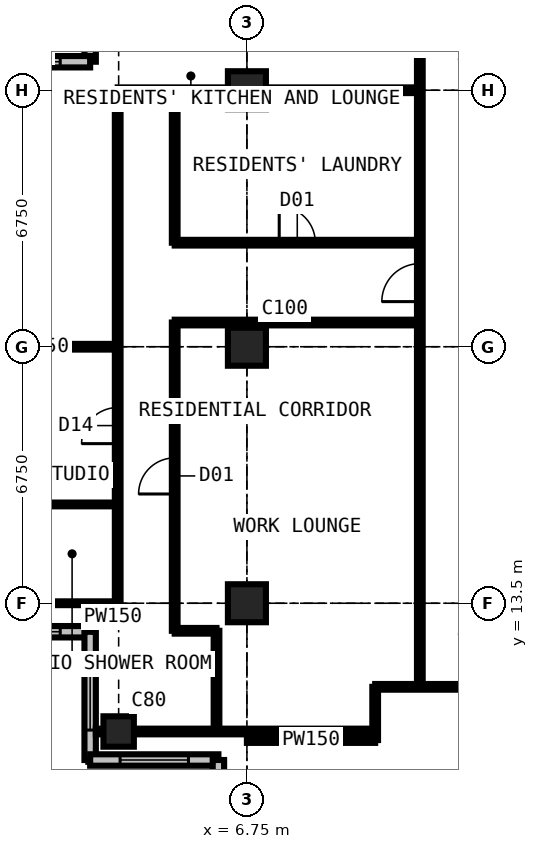
"""IFC4 building model, lengths in metres.
Left out: names, types, materials, properties, quantities, classifications, styles, units other than length and angle.
Written with IfcOpenShell. Run it as: python <this file> out.ifc"""

import sys

from ifc_helpers import new_model, si_unit, direction, frame, frame_2d, origin, origin_2d, place, context, subcontext, project, spatial, rectangle, extrude, element, fill, save


model = new_model("IFC4")
c1 = context("Model", 3, precision=1e-05, world=origin(), true_north=direction((0.0, 1.0)))
c2 = subcontext(c1, "Body", "Model", "MODEL_VIEW")
j1 = project(units=[si_unit("LENGTHUNIT", "METRE"), si_unit("PLANEANGLEUNIT", "RADIAN")], contexts=[c1])
p1 = place(None, origin())
s1 = spatial("IfcSite", under=j1, at=p1, CompositionType="ELEMENT")
p2 = place(p1, origin())
s2 = spatial("IfcBuilding", under=s1, at=p2, CompositionType="ELEMENT")
p3 = place(p2, frame((0.0, 0.0, 236.7)))
s3 = spatial("IfcBuildingStorey", under=s2, at=p3, CompositionType="ELEMENT", Elevation=236.7)
p4 = place(p3, frame((3.375, 10.125, 0.0), z_axis=(0.0, 0.0, 1.0), x_axis=(1.0, 0.0, 0.0)))
e1 = element("IfcColumn", 1, at=p4, inside=s3, PredefinedType="COLUMN", context=c2, shape_type="SweptSolid", body=[
    extrude(rectangle(XDim=0.8, YDim=0.8, at=origin_2d()), origin(), (0.0, 0.0, 1.0), 3.6),
])
for number, where, z_axis, x_axis in (
    (2, (6.75, 13.5, 0.0), (0.0, 0.0, 1.0), (1.0, 0.0, 0.0)),
    (3, (6.75, 20.25, 0.0), (0.0, 0.0, 1.0), (1.0, 0.0, 0.0)),
    (4, (6.75, 27.0, 0.0), (0.0, 0.0, 1.0), (1.0, 0.0, 0.0)),
):
    element("IfcColumn", number, at=place(p3, frame(where, z_axis=z_axis, x_axis=x_axis)), inside=s3, PredefinedType="COLUMN", context=c2, shape_type="SweptSolid", body=[
        extrude(rectangle(XDim=1.0, YDim=1.0, at=origin_2d()), origin(), (0.0, 0.0, 1.0), 3.6),
    ])
p5 = place(p3, frame((2.625, 31.125, 0.0), z_axis=(0.0, 0.0, 1.0), x_axis=(0.0, -1.0, 0.0)))
e5 = element("IfcWall", 5, at=p5, inside=s3, PredefinedType="SOLIDWALL", context=c2, shape_type="SweptSolid", body=[
    extrude(rectangle(XDim=3.375, YDim=0.3, at=frame_2d((1.688, 0.0))), origin(), (0.0, 0.0, 1.0), 3.375),
])
p6 = place(p5, frame((0.788, 0.0, 0.6)))
e6 = element("IfcOpeningElement", 6, at=p6, cuts=e5, PredefinedType="OPENING", context=c2, shape_type="SweptSolid", body=[
    extrude(rectangle(XDim=1.8, YDim=2.1, at=frame_2d((0.9, 1.05))), frame((0.0, 0.16, 0.0), z_axis=(0.0, -1.0, 0.0), x_axis=(1.0, 0.0, 0.0)), (0.0, 0.0, 1.0), 0.32),
])
p7 = place(p3, frame((2.625, 27.75, 0.0), z_axis=(0.0, 0.0, 1.0), x_axis=(-1.0, 0.0, 0.0)))
e7 = element("IfcWall", 7, at=p7, inside=s3, PredefinedType="SOLIDWALL", context=c2, shape_type="SweptSolid", body=[
    extrude(rectangle(XDim=3.375, YDim=0.3, at=frame_2d((1.688, 0.0))), origin(), (0.0, 0.0, 1.0), 3.375),
])
p8 = place(p7, frame((0.788, 0.0, 0.6)))
e8 = element("IfcOpeningElement", 8, at=p8, cuts=e7, PredefinedType="OPENING", context=c2, shape_type="SweptSolid", body=[
    extrude(rectangle(XDim=1.8, YDim=2.1, at=frame_2d((0.9, 1.05))), frame((0.0, 0.16, 0.0), z_axis=(0.0, -1.0, 0.0), x_axis=(1.0, 0.0, 0.0)), (0.0, 0.0, 1.0), 0.32),
])
p9 = place(p3, frame((-0.75, 12.75, 0.0), z_axis=(0.0, 0.0, 1.0), x_axis=(1.0, 0.0, 0.0)))
e9 = element("IfcWall", 9, at=p9, inside=s3, PredefinedType="SOLIDWALL", context=c2, shape_type="SweptSolid", body=[
    extrude(rectangle(XDim=3.375, YDim=0.3, at=frame_2d((1.688, 0.0))), origin(), (0.0, 0.0, 1.0), 3.375),
])
p10 = place(p9, frame((0.788, 0.0, 0.6)))
e10 = element("IfcOpeningElement", 10, at=p10, cuts=e9, PredefinedType="OPENING", context=c2, shape_type="SweptSolid", body=[
    extrude(rectangle(XDim=1.8, YDim=2.1, at=frame_2d((0.9, 1.05))), frame((0.0, 0.16, 0.0), z_axis=(0.0, -1.0, 0.0), x_axis=(1.0, 0.0, 0.0)), (0.0, 0.0, 1.0), 0.32),
])
p11 = place(p3, frame((2.625, 12.75, 0.0), z_axis=(0.0, 0.0, 1.0), x_axis=(0.0, -1.0, 0.0)))
e11 = element("IfcWall", 11, at=p11, inside=s3, PredefinedType="SOLIDWALL", context=c2, shape_type="SweptSolid", body=[
    extrude(rectangle(XDim=3.375, YDim=0.3, at=frame_2d((1.688, 0.0))), origin(), (0.0, 0.0, 1.0), 3.375),
])
p12 = place(p11, frame((0.788, 0.0, 0.6)))
e12 = element("IfcOpeningElement", 12, at=p12, cuts=e11, PredefinedType="OPENING", context=c2, shape_type="SweptSolid", body=[
    extrude(rectangle(XDim=1.8, YDim=2.1, at=frame_2d((0.9, 1.05))), frame((0.0, 0.16, 0.0), z_axis=(0.0, -1.0, 0.0), x_axis=(1.0, 0.0, 0.0)), (0.0, 0.0, 1.0), 0.32),
])
p13 = place(p3, frame((2.625, 9.375, 0.0), z_axis=(0.0, 0.0, 1.0), x_axis=(1.0, 0.0, 0.0)))
e13 = element("IfcWall", 13, at=p13, inside=s3, PredefinedType="SOLIDWALL", context=c2, shape_type="SweptSolid", body=[
    extrude(rectangle(XDim=3.375, YDim=0.3, at=frame_2d((1.688, 0.0))), origin(), (0.0, 0.0, 1.0), 3.375),
])
p14 = place(p13, frame((0.788, 0.0, 0.6)))
e14 = element("IfcOpeningElement", 14, at=p14, cuts=e13, PredefinedType="OPENING", context=c2, shape_type="SweptSolid", body=[
    extrude(rectangle(XDim=1.8, YDim=2.1, at=frame_2d((0.9, 1.05))), frame((0.0, 0.16, 0.0), z_axis=(0.0, -1.0, 0.0), x_axis=(1.0, 0.0, 0.0)), (0.0, 0.0, 1.0), 0.32),
])
p15 = place(p3, frame((6.0, 9.375, 0.0), z_axis=(0.0, 0.0, 1.0), x_axis=(0.0, -1.0, 0.0)))
e15 = element("IfcWall", 15, at=p15, inside=s3, PredefinedType="SOLIDWALL", context=c2, shape_type="SweptSolid", body=[
    extrude(rectangle(XDim=3.375, YDim=0.3, at=frame_2d((1.688, 0.0))), origin(), (0.0, 0.0, 1.0), 3.375),
])
p16 = place(p15, frame((0.788, 0.0, 0.6)))
e16 = element("IfcOpeningElement", 16, at=p16, cuts=e15, PredefinedType="OPENING", context=c2, shape_type="SweptSolid", body=[
    extrude(rectangle(XDim=1.8, YDim=2.1, at=frame_2d((0.9, 1.05))), frame((0.0, 0.16, 0.0), z_axis=(0.0, -1.0, 0.0), x_axis=(1.0, 0.0, 0.0)), (0.0, 0.0, 1.0), 0.32),
])
p17 = place(p3, frame((-0.734, 13.5, 0.0), z_axis=(0.0, 0.0, 1.0), x_axis=(1.0, 0.0, 0.0)))
e17 = element("IfcWall", 17, at=p17, inside=s3, PredefinedType="PARTITIONING", context=c2, shape_type="SweptSolid", body=[
    extrude(rectangle(XDim=4.084, YDim=0.1, at=frame_2d((2.042, 0.0))), origin(), (0.0, 0.0, 1.0), 2.877),
])
p18 = place(p3, frame((-0.734, 20.25, 0.0), z_axis=(0.0, 0.0, 1.0), x_axis=(1.0, 0.0, 0.0)))
e18 = element("IfcWall", 18, at=p18, inside=s3, PredefinedType="PARTITIONING", context=c2, shape_type="SweptSolid", body=[
    extrude(rectangle(XDim=4.084, YDim=0.15, at=frame_2d((2.042, 0.0))), origin(), (0.0, 0.0, 1.0), 2.877),
])
p19 = place(p3, frame((0.95, 16.1, 0.0), z_axis=(0.0, 0.0, 1.0), x_axis=(1.0, 0.0, 0.0)))
e19 = element("IfcWall", 19, at=p19, inside=s3, PredefinedType="PARTITIONING", context=c2, shape_type="SweptSolid", body=[
    extrude(rectangle(XDim=2.4, YDim=0.1, at=frame_2d((1.2, 0.0))), origin(), (0.0, 0.0, 1.0), 3.375),
])
p20 = place(p3, frame((2.625, 12.766, 0.0), z_axis=(0.0, 0.0, 1.0), x_axis=(0.0, 1.0, 0.0)))
e20 = element("IfcWall", 20, at=p20, inside=s3, PredefinedType="PARTITIONING", context=c2, shape_type="SweptSolid", body=[
    extrude(rectangle(XDim=0.734, YDim=0.15, at=frame_2d((0.367, 0.0))), origin(), (0.0, 0.0, 1.0), 3.375),
])
p21 = place(p3, frame((2.775, 10.125, 0.0), z_axis=(0.0, 0.0, 1.0), x_axis=(1.0, 0.0, 0.0)))
e21 = element("IfcWall", 21, at=p21, inside=s3, PredefinedType="PARTITIONING", context=c2, shape_type="SweptSolid", body=[
    extrude(rectangle(XDim=7.35, YDim=0.15, at=frame_2d((3.675, 0.0))), origin(), (0.0, 0.0, 1.0), 2.877),
])
p22 = place(p3, frame((3.35, 13.5, 0.0), z_axis=(0.0, 0.0, 1.0), x_axis=(0.0, 1.0, 0.0)))
e22 = element("IfcWall", 22, at=p22, inside=s3, PredefinedType="PARTITIONING", context=c2, shape_type="SweptSolid", body=[
    extrude(rectangle(XDim=13.5, YDim=0.15, at=frame_2d((6.75, 0.0))), origin(), (0.0, 0.0, 1.0), 3.375),
])
p23 = place(p22, frame((4.2, 0.0, 0.0)))
e23 = element("IfcOpeningElement", 23, at=p23, cuts=e22, PredefinedType="OPENING", context=c2, shape_type="SweptSolid", body=[
    extrude(rectangle(XDim=0.95, YDim=2.2, at=frame_2d((0.475, 1.1))), frame((0.0, 0.085, 0.0), z_axis=(0.0, -1.0, 0.0), x_axis=(1.0, 0.0, 0.0)), (0.0, 0.0, 1.0), 0.17),
])
p24 = place(p3, frame((3.35, 27.0, 0.0), z_axis=(0.0, 0.0, 1.0), x_axis=(1.0, 0.0, 0.0)))
e24 = element("IfcWall", 24, at=p24, inside=s3, PredefinedType="PARTITIONING", context=c2, shape_type="SweptSolid", body=[
    extrude(rectangle(XDim=7.95, YDim=0.15, at=frame_2d((3.975, 0.0))), origin(), (0.0, 0.0, 1.0), 2.877),
])
p25 = place(p3, frame((4.85, 12.775, 0.0), z_axis=(0.0, 0.0, 1.0), x_axis=(0.0, 1.0, 0.0)))
e25 = element("IfcWall", 25, at=p25, inside=s3, PredefinedType="PARTITIONING", context=c2, shape_type="SweptSolid", body=[
    extrude(rectangle(XDim=8.113, YDim=0.15, at=frame_2d((4.056, 0.0))), origin(), (0.0, 0.0, 1.0), 3.375),
])
p26 = place(p25, frame((3.6, 0.0, 0.0)))
e26 = element("IfcOpeningElement", 26, at=p26, cuts=e25, PredefinedType="OPENING", context=c2, shape_type="SweptSolid", body=[
    extrude(rectangle(XDim=0.95, YDim=2.2, at=frame_2d((0.475, 1.1))), frame((0.0, 0.085, 0.0), z_axis=(0.0, -1.0, 0.0), x_axis=(1.0, 0.0, 0.0)), (0.0, 0.0, 1.0), 0.17),
])
p27 = place(p3, frame((4.85, 12.775, 0.0), z_axis=(0.0, 0.0, 1.0), x_axis=(1.0, 0.0, 0.0)))
e27 = element("IfcWall", 27, at=p27, inside=s3, PredefinedType="PARTITIONING", context=c2, shape_type="SweptSolid", body=[
    extrude(rectangle(XDim=1.1, YDim=0.15, at=frame_2d((0.55, 0.0))), origin(), (0.0, 0.0, 1.0), 3.375),
])
p28 = place(p3, frame((4.85, 20.887, 0.0), z_axis=(0.0, 0.0, 1.0), x_axis=(1.0, 0.0, 0.0)))
e28 = element("IfcWall", 28, at=p28, inside=s3, PredefinedType="PARTITIONING", context=c2, shape_type="SweptSolid", body=[
    extrude(rectangle(XDim=6.45, YDim=0.15, at=frame_2d((3.225, 0.0))), origin(), (0.0, 0.0, 1.0), 3.375),
])
p29 = place(p3, frame((4.85, 22.988, 0.0), z_axis=(0.0, 0.0, 1.0), x_axis=(0.0, 1.0, 0.0)))
e29 = element("IfcWall", 29, at=p29, inside=s3, PredefinedType="PARTITIONING", context=c2, shape_type="SweptSolid", body=[
    extrude(rectangle(XDim=4.012, YDim=0.15, at=frame_2d((2.006, 0.0))), origin(), (0.0, 0.0, 1.0), 3.375),
])
p30 = place(p3, frame((4.85, 22.988, 0.0), z_axis=(0.0, 0.0, 1.0), x_axis=(1.0, 0.0, 0.0)))
e30 = element("IfcWall", 30, at=p30, inside=s3, PredefinedType="PARTITIONING", context=c2, shape_type="SweptSolid", body=[
    extrude(rectangle(XDim=6.45, YDim=0.15, at=frame_2d((3.225, 0.0))), origin(), (0.0, 0.0, 1.0), 3.375),
])
p31 = place(p30, frame((2.75, 0.0, 0.0)))
e31 = element("IfcOpeningElement", 31, at=p31, cuts=e30, PredefinedType="OPENING", context=c2, shape_type="SweptSolid", body=[
    extrude(rectangle(XDim=0.95, YDim=2.2, at=frame_2d((0.475, 1.1))), frame((0.0, 0.085, 0.0), z_axis=(0.0, -1.0, 0.0), x_axis=(1.0, 0.0, 0.0)), (0.0, 0.0, 1.0), 0.17),
])
p32 = place(p3, frame((5.95, 10.125, 0.0), z_axis=(0.0, 0.0, 1.0), x_axis=(0.0, 1.0, 0.0)))
e32 = element("IfcWall", 32, at=p32, inside=s3, PredefinedType="PARTITIONING", context=c2, shape_type="SweptSolid", body=[
    extrude(rectangle(XDim=2.65, YDim=0.15, at=frame_2d((1.325, 0.0))), origin(), (0.0, 0.0, 1.0), 3.375),
])
p33 = place(p3, frame((6.75, 9.9, 0.0), z_axis=(0.0, 0.0, 1.0), x_axis=(1.0, 0.0, 0.0)))
e33 = element("IfcWall", 33, at=p33, inside=s3, PredefinedType="PARTITIONING", context=c2, shape_type="SweptSolid", body=[
    extrude(rectangle(XDim=3.375, YDim=0.15, at=frame_2d((1.688, 0.0))), origin(), (0.0, 0.0, 1.0), 3.375),
])
p34 = place(p3, frame((10.125, 9.9, 0.0), z_axis=(0.0, 0.0, 1.0), x_axis=(0.0, 1.0, 0.0)))
e34 = element("IfcWall", 34, at=p34, inside=s3, PredefinedType="PARTITIONING", context=c2, shape_type="SweptSolid", body=[
    extrude(rectangle(XDim=1.4, YDim=0.15, at=frame_2d((0.7, 0.0))), origin(), (0.0, 0.0, 1.0), 3.375),
])
p35 = place(p3, frame((10.125, 11.3, 0.0), z_axis=(0.0, 0.0, 1.0), x_axis=(1.0, 0.0, 0.0)))
e35 = element("IfcWall", 35, at=p35, inside=s3, PredefinedType="PARTITIONING", context=c2, shape_type="SweptSolid", body=[
    extrude(rectangle(XDim=3.375, YDim=0.15, at=frame_2d((1.688, 0.0))), origin(), (0.0, 0.0, 1.0), 3.375),
])
p36 = place(p3, frame((11.3, 11.3, 0.0), z_axis=(0.0, 0.0, 1.0), x_axis=(0.0, 1.0, 0.0)))
e36 = element("IfcWall", 36, at=p36, inside=s3, PredefinedType="PARTITIONING", context=c2, shape_type="SweptSolid", body=[
    extrude(rectangle(XDim=19.3, YDim=0.15, at=frame_2d((9.65, 0.0))), origin(), (0.0, 0.0, 1.0), 3.375),
])
p37 = place(p36, frame((18.1, 0.0, 0.0)))
e37 = element("IfcOpeningElement", 37, at=p37, cuts=e36, PredefinedType="OPENING", context=c2, shape_type="SweptSolid", body=[
    extrude(rectangle(XDim=1.0, YDim=2.2, at=frame_2d((0.5, 1.1))), frame((0.0, 0.085, 0.0), z_axis=(0.0, -1.0, 0.0), x_axis=(1.0, 0.0, 0.0)), (0.0, 0.0, 1.0), 0.17),
])
p38 = place(p36, frame((10.137, 0.0, 0.0)))
e38 = element("IfcOpeningElement", 38, at=p38, cuts=e36, PredefinedType="OPENING", context=c2, shape_type="SweptSolid", body=[
    extrude(rectangle(XDim=1.0, YDim=2.2, at=frame_2d((0.5, 1.1))), frame((0.0, 0.085, 0.0), z_axis=(0.0, -1.0, 0.0), x_axis=(1.0, 0.0, 0.0)), (0.0, 0.0, 1.0), 0.17),
])
p39 = place(p8, origin())
e39 = element("IfcWindow", 39, at=p39, inside=s3, PartitioningType="SINGLE_PANEL", PredefinedType="WINDOW", context=c2, shape_type="SweptSolid", body=[
    extrude(rectangle(XDim=1.8, YDim=2.1, at=frame_2d((0.9, 1.05))), frame((0.0, 0.03, 0.0), z_axis=(0.0, -1.0, 0.0), x_axis=(1.0, 0.0, 0.0)), (0.0, 0.0, 1.0), 0.06),
])
fill(e8, e39)
p40 = place(p10, origin())
e40 = element("IfcWindow", 40, at=p40, inside=s3, PartitioningType="SINGLE_PANEL", PredefinedType="WINDOW", context=c2, shape_type="SweptSolid", body=[
    extrude(rectangle(XDim=1.8, YDim=2.1, at=frame_2d((0.9, 1.05))), frame((0.0, 0.03, 0.0), z_axis=(0.0, -1.0, 0.0), x_axis=(1.0, 0.0, 0.0)), (0.0, 0.0, 1.0), 0.06),
])
fill(e10, e40)
p41 = place(p12, origin())
e41 = element("IfcWindow", 41, at=p41, inside=s3, PartitioningType="SINGLE_PANEL", PredefinedType="WINDOW", context=c2, shape_type="SweptSolid", body=[
    extrude(rectangle(XDim=1.8, YDim=2.1, at=frame_2d((0.9, 1.05))), frame((0.0, 0.03, 0.0), z_axis=(0.0, -1.0, 0.0), x_axis=(1.0, 0.0, 0.0)), (0.0, 0.0, 1.0), 0.06),
])
fill(e12, e41)
p42 = place(p14, origin())
e42 = element("IfcWindow", 42, at=p42, inside=s3, PartitioningType="SINGLE_PANEL", PredefinedType="WINDOW", context=c2, shape_type="SweptSolid", body=[
    extrude(rectangle(XDim=1.8, YDim=2.1, at=frame_2d((0.9, 1.05))), frame((0.0, 0.03, 0.0), z_axis=(0.0, -1.0, 0.0), x_axis=(1.0, 0.0, 0.0)), (0.0, 0.0, 1.0), 0.06),
])
fill(e14, e42)
p43 = place(p23, origin())
e43 = element("IfcDoor", 43, at=p43, inside=s3, OperationType="SINGLE_SWING_LEFT", PredefinedType="DOOR", context=c2, shape_type="SweptSolid", body=[
    extrude(rectangle(XDim=0.95, YDim=2.2, at=frame_2d((0.475, 1.1))), frame((0.0, 0.025, 0.0), z_axis=(0.0, -1.0, 0.0), x_axis=(1.0, 0.0, 0.0)), (0.0, 0.0, 1.0), 0.05),
])
fill(e23, e43)
p44 = place(p38, origin())
e44 = element("IfcDoor", 44, at=p44, inside=s3, OperationType="SINGLE_SWING_LEFT", PredefinedType="DOOR", context=c2, shape_type="SweptSolid", body=[
    extrude(rectangle(XDim=1.0, YDim=2.2, at=frame_2d((0.5, 1.1))), frame((0.0, 0.025, 0.0), z_axis=(0.0, -1.0, 0.0), x_axis=(1.0, 0.0, 0.0)), (0.0, 0.0, 1.0), 0.05),
])
fill(e38, e44)
p45 = place(p31, origin())
e45 = element("IfcDoor", 45, at=p45, inside=s3, OperationType="SINGLE_SWING_LEFT", PredefinedType="DOOR", context=c2, shape_type="SweptSolid", body=[
    extrude(rectangle(XDim=0.95, YDim=2.2, at=frame_2d((0.475, 1.1))), frame((0.0, 0.025, 0.0), z_axis=(0.0, -1.0, 0.0), x_axis=(1.0, 0.0, 0.0)), (0.0, 0.0, 1.0), 0.05),
])
fill(e31, e45)
p46 = place(p26, origin())
e46 = element("IfcDoor", 46, at=p46, inside=s3, OperationType="SINGLE_SWING_LEFT", PredefinedType="DOOR", context=c2, shape_type="SweptSolid", body=[
    extrude(rectangle(XDim=0.95, YDim=2.2, at=frame_2d((0.475, 1.1))), frame((0.0, 0.025, 0.0), z_axis=(0.0, -1.0, 0.0), x_axis=(1.0, 0.0, 0.0)), (0.0, 0.0, 1.0), 0.05),
])
fill(e26, e46)
save(model, sys.argv[1])
